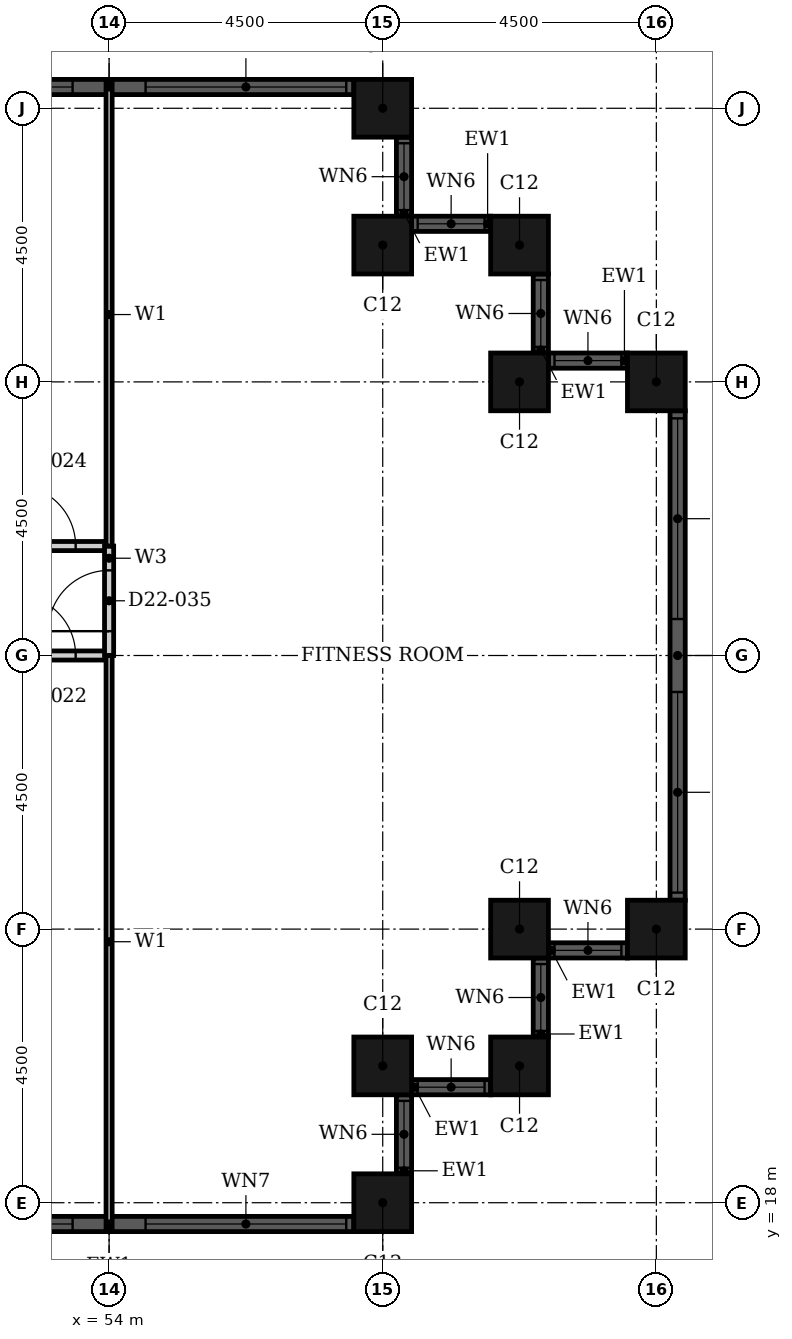
"""IFC4 building model, lengths in metres.
Left out: names, types, materials, properties, quantities, classifications, styles, units other than length and angle.
Written with IfcOpenShell. Run it as: python <this file> out.ifc"""

import sys

from ifc_helpers import new_model, si_unit, direction, frame, frame_2d, origin, origin_2d, place, context, subcontext, project, spatial, rectangle, hollow_rectangle, extrude, element, fill, save


model = new_model("IFC4")
c1 = context("Model", 3, precision=1e-05, world=origin(), true_north=direction((0.0, 1.0)))
c2 = subcontext(c1, "Body", "Model", "MODEL_VIEW")
j1 = project(units=[si_unit("LENGTHUNIT", "METRE"), si_unit("PLANEANGLEUNIT", "RADIAN")], contexts=[c1])
p1 = place(None, origin())
s1 = spatial("IfcSite", under=j1, at=p1, CompositionType="ELEMENT")
p2 = place(p1, origin())
s2 = spatial("IfcBuilding", under=s1, at=p2, CompositionType="ELEMENT")
p3 = place(p2, frame((0.0, 0.0, 92.4)))
s3 = spatial("IfcBuildingStorey", under=s2, at=p3, CompositionType="ELEMENT", Elevation=92.4)
for number, where, z_axis, x_axis in (
    (1, (58.5, 18.0, 0.0), (0.0, 0.0, 1.0), (1.0, 0.0, 0.0)),
    (2, (58.5, 20.25, 0.0), (0.0, 0.0, 1.0), (1.0, 0.0, 0.0)),
    (3, (60.75, 20.25, 0.0), (0.0, 0.0, 1.0), (1.0, 0.0, 0.0)),
    (4, (60.75, 22.5, 0.0), (0.0, 0.0, 1.0), (1.0, 0.0, 0.0)),
    (5, (63.0, 22.5, 0.0), (0.0, 0.0, 1.0), (1.0, 0.0, 0.0)),
    (6, (63.0, 31.5, 0.0), (0.0, 0.0, 1.0), (1.0, 0.0, 0.0)),
    (7, (60.75, 31.5, 0.0), (0.0, 0.0, 1.0), (1.0, 0.0, 0.0)),
    (8, (60.75, 33.75, 0.0), (0.0, 0.0, 1.0), (1.0, 0.0, 0.0)),
    (9, (58.5, 33.75, 0.0), (0.0, 0.0, 1.0), (1.0, 0.0, 0.0)),
    (10, (58.5, 36.0, 0.0), (0.0, 0.0, 1.0), (1.0, 0.0, 0.0)),
):
    element("IfcColumn", number, at=place(p3, frame(where, z_axis=z_axis, x_axis=x_axis)), inside=s3, PredefinedType="COLUMN", context=c2, shape_type="SweptSolid", body=[
        extrude(hollow_rectangle(XDim=0.95, YDim=0.95, WallThickness=0.03, at=origin_2d()), origin(), (0.0, 0.0, 1.0), 3.6),
    ])
p4 = place(p3, frame((49.975, 17.65, 0.0), z_axis=(0.0, 0.0, 1.0), x_axis=(1.0, 0.0, 0.0)))
e11 = element("IfcWall", 11, at=p4, inside=s3, PredefinedType="SOLIDWALL", context=c2, shape_type="SweptSolid", body=[
    extrude(rectangle(XDim=8.05, YDim=0.25, at=frame_2d((4.025, 0.0))), origin(), (0.0, 0.0, 1.0), 3.6),
])
p5 = place(p4, frame((0.125, 0.0, 0.9)))
e12 = element("IfcOpeningElement", 12, at=p5, cuts=e11, PredefinedType="OPENING", context=c2, shape_type="SweptSolid", body=[
    extrude(rectangle(XDim=3.3, YDim=1.85, at=frame_2d((1.65, 0.925))), frame((0.0, 0.135, 0.0), z_axis=(0.0, -1.0, 0.0), x_axis=(1.0, 0.0, 0.0)), (0.0, 0.0, 1.0), 0.27),
])
p6 = place(p4, frame((4.625, 0.0, 0.9)))
e13 = element("IfcOpeningElement", 13, at=p6, cuts=e11, PredefinedType="OPENING", context=c2, shape_type="SweptSolid", body=[
    extrude(rectangle(XDim=3.3, YDim=1.85, at=frame_2d((1.65, 0.925))), frame((0.0, 0.135, 0.0), z_axis=(0.0, -1.0, 0.0), x_axis=(1.0, 0.0, 0.0)), (0.0, 0.0, 1.0), 0.27),
])
p7 = place(p3, frame((58.85, 18.475, 0.0), z_axis=(0.0, 0.0, 1.0), x_axis=(0.0, 1.0, 0.0)))
e14 = element("IfcWall", 14, at=p7, inside=s3, PredefinedType="SOLIDWALL", context=c2, shape_type="SweptSolid", body=[
    extrude(rectangle(XDim=1.3, YDim=0.25, at=frame_2d((0.65, 0.0))), origin(), (0.0, 0.0, 1.0), 3.6),
])
p8 = place(p7, frame((0.1, 0.0, 0.9)))
e15 = element("IfcOpeningElement", 15, at=p8, cuts=e14, PredefinedType="OPENING", context=c2, shape_type="SweptSolid", body=[
    extrude(rectangle(XDim=1.1, YDim=1.85, at=frame_2d((0.55, 0.925))), frame((0.0, 0.135, 0.0), z_axis=(0.0, -1.0, 0.0), x_axis=(1.0, 0.0, 0.0)), (0.0, 0.0, 1.0), 0.27),
])
p9 = place(p3, frame((58.975, 19.9, 0.0), z_axis=(0.0, 0.0, 1.0), x_axis=(1.0, 0.0, 0.0)))
e16 = element("IfcWall", 16, at=p9, inside=s3, PredefinedType="SOLIDWALL", context=c2, shape_type="SweptSolid", body=[
    extrude(rectangle(XDim=1.3, YDim=0.25, at=frame_2d((0.65, 0.0))), origin(), (0.0, 0.0, 1.0), 3.6),
])
p10 = place(p9, frame((0.1, 0.0, 0.9)))
e17 = element("IfcOpeningElement", 17, at=p10, cuts=e16, PredefinedType="OPENING", context=c2, shape_type="SweptSolid", body=[
    extrude(rectangle(XDim=1.1, YDim=1.85, at=frame_2d((0.55, 0.925))), frame((0.0, 0.135, 0.0), z_axis=(0.0, -1.0, 0.0), x_axis=(1.0, 0.0, 0.0)), (0.0, 0.0, 1.0), 0.27),
])
p11 = place(p3, frame((61.1, 20.725, 0.0), z_axis=(0.0, 0.0, 1.0), x_axis=(0.0, 1.0, 0.0)))
e18 = element("IfcWall", 18, at=p11, inside=s3, PredefinedType="SOLIDWALL", context=c2, shape_type="SweptSolid", body=[
    extrude(rectangle(XDim=1.3, YDim=0.25, at=frame_2d((0.65, 0.0))), origin(), (0.0, 0.0, 1.0), 3.6),
])
p12 = place(p11, frame((0.1, 0.0, 0.9)))
e19 = element("IfcOpeningElement", 19, at=p12, cuts=e18, PredefinedType="OPENING", context=c2, shape_type="SweptSolid", body=[
    extrude(rectangle(XDim=1.1, YDim=1.85, at=frame_2d((0.55, 0.925))), frame((0.0, 0.135, 0.0), z_axis=(0.0, -1.0, 0.0), x_axis=(1.0, 0.0, 0.0)), (0.0, 0.0, 1.0), 0.27),
])
p13 = place(p3, frame((61.225, 22.15, 0.0), z_axis=(0.0, 0.0, 1.0), x_axis=(1.0, 0.0, 0.0)))
e20 = element("IfcWall", 20, at=p13, inside=s3, PredefinedType="SOLIDWALL", context=c2, shape_type="SweptSolid", body=[
    extrude(rectangle(XDim=1.3, YDim=0.25, at=frame_2d((0.65, 0.0))), origin(), (0.0, 0.0, 1.0), 3.6),
])
p14 = place(p13, frame((0.1, 0.0, 0.9)))
e21 = element("IfcOpeningElement", 21, at=p14, cuts=e20, PredefinedType="OPENING", context=c2, shape_type="SweptSolid", body=[
    extrude(rectangle(XDim=1.1, YDim=1.85, at=frame_2d((0.55, 0.925))), frame((0.0, 0.135, 0.0), z_axis=(0.0, -1.0, 0.0), x_axis=(1.0, 0.0, 0.0)), (0.0, 0.0, 1.0), 0.27),
])
p15 = place(p3, frame((63.35, 22.975, 0.0), z_axis=(0.0, 0.0, 1.0), x_axis=(0.0, 1.0, 0.0)))
e22 = element("IfcWall", 22, at=p15, inside=s3, PredefinedType="SOLIDWALL", context=c2, shape_type="SweptSolid", body=[
    extrude(rectangle(XDim=8.05, YDim=0.25, at=frame_2d((4.025, 0.0))), origin(), (0.0, 0.0, 1.0), 3.6),
])
p16 = place(p15, frame((0.125, 0.0, 0.9)))
e23 = element("IfcOpeningElement", 23, at=p16, cuts=e22, PredefinedType="OPENING", context=c2, shape_type="SweptSolid", body=[
    extrude(rectangle(XDim=3.3, YDim=1.85, at=frame_2d((1.65, 0.925))), frame((0.0, 0.135, 0.0), z_axis=(0.0, -1.0, 0.0), x_axis=(1.0, 0.0, 0.0)), (0.0, 0.0, 1.0), 0.27),
])
p17 = place(p15, frame((4.625, 0.0, 0.9)))
e24 = element("IfcOpeningElement", 24, at=p17, cuts=e22, PredefinedType="OPENING", context=c2, shape_type="SweptSolid", body=[
    extrude(rectangle(XDim=3.3, YDim=1.85, at=frame_2d((1.65, 0.925))), frame((0.0, 0.135, 0.0), z_axis=(0.0, -1.0, 0.0), x_axis=(1.0, 0.0, 0.0)), (0.0, 0.0, 1.0), 0.27),
])
p18 = place(p3, frame((62.525, 31.85, 0.0), z_axis=(0.0, 0.0, 1.0), x_axis=(-1.0, 0.0, 0.0)))
e25 = element("IfcWall", 25, at=p18, inside=s3, PredefinedType="SOLIDWALL", context=c2, shape_type="SweptSolid", body=[
    extrude(rectangle(XDim=1.3, YDim=0.25, at=frame_2d((0.65, 0.0))), origin(), (0.0, 0.0, 1.0), 3.6),
])
p19 = place(p18, frame((0.1, 0.0, 0.9)))
e26 = element("IfcOpeningElement", 26, at=p19, cuts=e25, PredefinedType="OPENING", context=c2, shape_type="SweptSolid", body=[
    extrude(rectangle(XDim=1.1, YDim=1.85, at=frame_2d((0.55, 0.925))), frame((0.0, 0.135, 0.0), z_axis=(0.0, -1.0, 0.0), x_axis=(1.0, 0.0, 0.0)), (0.0, 0.0, 1.0), 0.27),
])
p20 = place(p3, frame((61.1, 31.975, 0.0), z_axis=(0.0, 0.0, 1.0), x_axis=(0.0, 1.0, 0.0)))
e27 = element("IfcWall", 27, at=p20, inside=s3, PredefinedType="SOLIDWALL", context=c2, shape_type="SweptSolid", body=[
    extrude(rectangle(XDim=1.3, YDim=0.25, at=frame_2d((0.65, 0.0))), origin(), (0.0, 0.0, 1.0), 3.6),
])
p21 = place(p20, frame((0.1, 0.0, 0.9)))
e28 = element("IfcOpeningElement", 28, at=p21, cuts=e27, PredefinedType="OPENING", context=c2, shape_type="SweptSolid", body=[
    extrude(rectangle(XDim=1.1, YDim=1.85, at=frame_2d((0.55, 0.925))), frame((0.0, 0.135, 0.0), z_axis=(0.0, -1.0, 0.0), x_axis=(1.0, 0.0, 0.0)), (0.0, 0.0, 1.0), 0.27),
])
p22 = place(p3, frame((60.275, 34.1, 0.0), z_axis=(0.0, 0.0, 1.0), x_axis=(-1.0, 0.0, 0.0)))
e29 = element("IfcWall", 29, at=p22, inside=s3, PredefinedType="SOLIDWALL", context=c2, shape_type="SweptSolid", body=[
    extrude(rectangle(XDim=1.3, YDim=0.25, at=frame_2d((0.65, 0.0))), origin(), (0.0, 0.0, 1.0), 3.6),
])
p23 = place(p22, frame((0.1, 0.0, 0.9)))
e30 = element("IfcOpeningElement", 30, at=p23, cuts=e29, PredefinedType="OPENING", context=c2, shape_type="SweptSolid", body=[
    extrude(rectangle(XDim=1.1, YDim=1.85, at=frame_2d((0.55, 0.925))), frame((0.0, 0.135, 0.0), z_axis=(0.0, -1.0, 0.0), x_axis=(1.0, 0.0, 0.0)), (0.0, 0.0, 1.0), 0.27),
])
p24 = place(p3, frame((58.85, 34.225, 0.0), z_axis=(0.0, 0.0, 1.0), x_axis=(0.0, 1.0, 0.0)))
e31 = element("IfcWall", 31, at=p24, inside=s3, PredefinedType="SOLIDWALL", context=c2, shape_type="SweptSolid", body=[
    extrude(rectangle(XDim=1.3, YDim=0.25, at=frame_2d((0.65, 0.0))), origin(), (0.0, 0.0, 1.0), 3.6),
])
p25 = place(p24, frame((0.1, 0.0, 0.9)))
e32 = element("IfcOpeningElement", 32, at=p25, cuts=e31, PredefinedType="OPENING", context=c2, shape_type="SweptSolid", body=[
    extrude(rectangle(XDim=1.1, YDim=1.85, at=frame_2d((0.55, 0.925))), frame((0.0, 0.135, 0.0), z_axis=(0.0, -1.0, 0.0), x_axis=(1.0, 0.0, 0.0)), (0.0, 0.0, 1.0), 0.27),
])
p26 = place(p3, frame((58.025, 36.35, 0.0), z_axis=(0.0, 0.0, 1.0), x_axis=(-1.0, 0.0, 0.0)))
e33 = element("IfcWall", 33, at=p26, inside=s3, PredefinedType="SOLIDWALL", context=c2, shape_type="SweptSolid", body=[
    extrude(rectangle(XDim=8.05, YDim=0.25, at=frame_2d((4.025, 0.0))), origin(), (0.0, 0.0, 1.0), 3.6),
])
p27 = place(p26, frame((0.125, 0.0, 0.9)))
e34 = element("IfcOpeningElement", 34, at=p27, cuts=e33, PredefinedType="OPENING", context=c2, shape_type="SweptSolid", body=[
    extrude(rectangle(XDim=3.3, YDim=1.85, at=frame_2d((1.65, 0.925))), frame((0.0, 0.135, 0.0), z_axis=(0.0, -1.0, 0.0), x_axis=(1.0, 0.0, 0.0)), (0.0, 0.0, 1.0), 0.27),
])
p28 = place(p26, frame((4.625, 0.0, 0.9)))
e35 = element("IfcOpeningElement", 35, at=p28, cuts=e33, PredefinedType="OPENING", context=c2, shape_type="SweptSolid", body=[
    extrude(rectangle(XDim=3.3, YDim=1.85, at=frame_2d((1.65, 0.925))), frame((0.0, 0.135, 0.0), z_axis=(0.0, -1.0, 0.0), x_axis=(1.0, 0.0, 0.0)), (0.0, 0.0, 1.0), 0.27),
])
p29 = place(p3, frame((46.8, 27.0, 0.0), z_axis=(0.0, 0.0, 1.0), x_axis=(1.0, 0.0, 0.0)))
e36 = element("IfcWall", 36, at=p29, inside=s3, PredefinedType="PARTITIONING", context=c2, shape_type="SweptSolid", body=[
    extrude(rectangle(XDim=7.2, YDim=0.15, at=frame_2d((3.6, 0.0))), origin(), (0.0, 0.0, 1.0), 2.48),
])
p30 = place(p29, frame((5.65, 0.0, 0.0)))
e37 = element("IfcOpeningElement", 37, at=p30, cuts=e36, PredefinedType="OPENING", context=c2, shape_type="SweptSolid", body=[
    extrude(rectangle(XDim=1.0, YDim=2.1, at=frame_2d((0.5, 1.05))), frame((0.0, 0.085, 0.0), z_axis=(0.0, -1.0, 0.0), x_axis=(1.0, 0.0, 0.0)), (0.0, 0.0, 1.0), 0.17),
])
p31 = place(p3, frame((46.8, 28.8, 0.0), z_axis=(0.0, 0.0, 1.0), x_axis=(1.0, 0.0, 0.0)))
e38 = element("IfcWall", 38, at=p31, inside=s3, PredefinedType="PARTITIONING", context=c2, shape_type="SweptSolid", body=[
    extrude(rectangle(XDim=7.2, YDim=0.15, at=frame_2d((3.6, 0.0))), origin(), (0.0, 0.0, 1.0), 3.2),
])
p32 = place(p31, frame((5.65, 0.0, 0.0)))
e39 = element("IfcOpeningElement", 39, at=p32, cuts=e38, PredefinedType="OPENING", context=c2, shape_type="SweptSolid", body=[
    extrude(rectangle(XDim=1.0, YDim=2.1, at=frame_2d((0.5, 1.05))), frame((0.0, 0.085, 0.0), z_axis=(0.0, -1.0, 0.0), x_axis=(1.0, 0.0, 0.0)), (0.0, 0.0, 1.0), 0.17),
])
p33 = place(p3, frame((54.0, 27.0, 0.0), z_axis=(0.0, 0.0, 1.0), x_axis=(0.0, 1.0, 0.0)))
e40 = element("IfcWall", 40, at=p33, inside=s3, PredefinedType="PARTITIONING", context=c2, shape_type="SweptSolid", body=[
    extrude(rectangle(XDim=1.8, YDim=0.15, at=frame_2d((0.9, 0.0))), origin(), (0.0, 0.0, 1.0), 3.2),
])
p34 = place(p33, frame((0.4, 0.0, 0.0)))
e41 = element("IfcOpeningElement", 41, at=p34, cuts=e40, PredefinedType="OPENING", context=c2, shape_type="SweptSolid", body=[
    extrude(rectangle(XDim=1.0, YDim=2.1, at=frame_2d((0.5, 1.05))), frame((0.0, 0.085, 0.0), z_axis=(0.0, -1.0, 0.0), x_axis=(1.0, 0.0, 0.0)), (0.0, 0.0, 1.0), 0.17),
])
p35 = place(p3, frame((54.0, 28.8, 0.0), z_axis=(0.0, 0.0, 1.0), x_axis=(0.0, 1.0, 0.0)))
e42 = element("IfcWall", 42, at=p35, inside=s3, PredefinedType="PARTITIONING", context=c2, shape_type="SweptSolid", body=[
    extrude(rectangle(XDim=7.615, YDim=0.1, at=frame_2d((3.808, 0.0))), origin(), (0.0, 0.0, 1.0), 3.2),
])
p36 = place(p3, frame((54.0, 17.585, 0.0), z_axis=(0.0, 0.0, 1.0), x_axis=(0.0, 1.0, 0.0)))
e43 = element("IfcWall", 43, at=p36, inside=s3, PredefinedType="PARTITIONING", context=c2, shape_type="SweptSolid", body=[
    extrude(rectangle(XDim=9.415, YDim=0.1, at=frame_2d((4.708, 0.0))), origin(), (0.0, 0.0, 1.0), 3.2),
])
p37 = place(p5, origin())
e44 = element("IfcWindow", 44, at=p37, inside=s3, PartitioningType="SINGLE_PANEL", PredefinedType="WINDOW", context=c2, shape_type="SweptSolid", body=[
    extrude(rectangle(XDim=3.3, YDim=1.85, at=frame_2d((1.65, 0.925))), frame((0.0, 0.03, 0.0), z_axis=(0.0, -1.0, 0.0), x_axis=(1.0, 0.0, 0.0)), (0.0, 0.0, 1.0), 0.06),
])
fill(e12, e44)
p38 = place(p6, origin())
e45 = element("IfcWindow", 45, at=p38, inside=s3, PartitioningType="SINGLE_PANEL", PredefinedType="WINDOW", context=c2, shape_type="SweptSolid", body=[
    extrude(rectangle(XDim=3.3, YDim=1.85, at=frame_2d((1.65, 0.925))), frame((0.0, 0.03, 0.0), z_axis=(0.0, -1.0, 0.0), x_axis=(1.0, 0.0, 0.0)), (0.0, 0.0, 1.0), 0.06),
])
fill(e13, e45)
p39 = place(p8, origin())
e46 = element("IfcWindow", 46, at=p39, inside=s3, PartitioningType="SINGLE_PANEL", PredefinedType="WINDOW", context=c2, shape_type="SweptSolid", body=[
    extrude(rectangle(XDim=1.1, YDim=1.85, at=frame_2d((0.55, 0.925))), frame((0.0, 0.03, 0.0), z_axis=(0.0, -1.0, 0.0), x_axis=(1.0, 0.0, 0.0)), (0.0, 0.0, 1.0), 0.06),
])
fill(e15, e46)
p40 = place(p10, origin())
e47 = element("IfcWindow", 47, at=p40, inside=s3, PartitioningType="SINGLE_PANEL", PredefinedType="WINDOW", context=c2, shape_type="SweptSolid", body=[
    extrude(rectangle(XDim=1.1, YDim=1.85, at=frame_2d((0.55, 0.925))), frame((0.0, 0.03, 0.0), z_axis=(0.0, -1.0, 0.0), x_axis=(1.0, 0.0, 0.0)), (0.0, 0.0, 1.0), 0.06),
])
fill(e17, e47)
p41 = place(p12, origin())
e48 = element("IfcWindow", 48, at=p41, inside=s3, PartitioningType="SINGLE_PANEL", PredefinedType="WINDOW", context=c2, shape_type="SweptSolid", body=[
    extrude(rectangle(XDim=1.1, YDim=1.85, at=frame_2d((0.55, 0.925))), frame((0.0, 0.03, 0.0), z_axis=(0.0, -1.0, 0.0), x_axis=(1.0, 0.0, 0.0)), (0.0, 0.0, 1.0), 0.06),
])
fill(e19, e48)
p42 = place(p14, origin())
e49 = element("IfcWindow", 49, at=p42, inside=s3, PartitioningType="SINGLE_PANEL", PredefinedType="WINDOW", context=c2, shape_type="SweptSolid", body=[
    extrude(rectangle(XDim=1.1, YDim=1.85, at=frame_2d((0.55, 0.925))), frame((0.0, 0.03, 0.0), z_axis=(0.0, -1.0, 0.0), x_axis=(1.0, 0.0, 0.0)), (0.0, 0.0, 1.0), 0.06),
])
fill(e21, e49)
p43 = place(p16, origin())
e50 = element("IfcWindow", 50, at=p43, inside=s3, PartitioningType="SINGLE_PANEL", PredefinedType="WINDOW", context=c2, shape_type="SweptSolid", body=[
    extrude(rectangle(XDim=3.3, YDim=1.85, at=frame_2d((1.65, 0.925))), frame((0.0, 0.03, 0.0), z_axis=(0.0, -1.0, 0.0), x_axis=(1.0, 0.0, 0.0)), (0.0, 0.0, 1.0), 0.06),
])
fill(e23, e50)
p44 = place(p17, origin())
e51 = element("IfcWindow", 51, at=p44, inside=s3, PartitioningType="SINGLE_PANEL", PredefinedType="WINDOW", context=c2, shape_type="SweptSolid", body=[
    extrude(rectangle(XDim=3.3, YDim=1.85, at=frame_2d((1.65, 0.925))), frame((0.0, 0.03, 0.0), z_axis=(0.0, -1.0, 0.0), x_axis=(1.0, 0.0, 0.0)), (0.0, 0.0, 1.0), 0.06),
])
fill(e24, e51)
p45 = place(p19, origin())
e52 = element("IfcWindow", 52, at=p45, inside=s3, PartitioningType="SINGLE_PANEL", PredefinedType="WINDOW", context=c2, shape_type="SweptSolid", body=[
    extrude(rectangle(XDim=1.1, YDim=1.85, at=frame_2d((0.55, 0.925))), frame((0.0, 0.03, 0.0), z_axis=(0.0, -1.0, 0.0), x_axis=(1.0, 0.0, 0.0)), (0.0, 0.0, 1.0), 0.06),
])
fill(e26, e52)
p46 = place(p21, origin())
e53 = element("IfcWindow", 53, at=p46, inside=s3, PartitioningType="SINGLE_PANEL", PredefinedType="WINDOW", context=c2, shape_type="SweptSolid", body=[
    extrude(rectangle(XDim=1.1, YDim=1.85, at=frame_2d((0.55, 0.925))), frame((0.0, 0.03, 0.0), z_axis=(0.0, -1.0, 0.0), x_axis=(1.0, 0.0, 0.0)), (0.0, 0.0, 1.0), 0.06),
])
fill(e28, e53)
p47 = place(p23, origin())
e54 = element("IfcWindow", 54, at=p47, inside=s3, PartitioningType="SINGLE_PANEL", PredefinedType="WINDOW", context=c2, shape_type="SweptSolid", body=[
    extrude(rectangle(XDim=1.1, YDim=1.85, at=frame_2d((0.55, 0.925))), frame((0.0, 0.03, 0.0), z_axis=(0.0, -1.0, 0.0), x_axis=(1.0, 0.0, 0.0)), (0.0, 0.0, 1.0), 0.06),
])
fill(e30, e54)
p48 = place(p25, origin())
e55 = element("IfcWindow", 55, at=p48, inside=s3, PartitioningType="SINGLE_PANEL", PredefinedType="WINDOW", context=c2, shape_type="SweptSolid", body=[
    extrude(rectangle(XDim=1.1, YDim=1.85, at=frame_2d((0.55, 0.925))), frame((0.0, 0.03, 0.0), z_axis=(0.0, -1.0, 0.0), x_axis=(1.0, 0.0, 0.0)), (0.0, 0.0, 1.0), 0.06),
])
fill(e32, e55)
p49 = place(p27, origin())
e56 = element("IfcWindow", 56, at=p49, inside=s3, PartitioningType="SINGLE_PANEL", PredefinedType="WINDOW", context=c2, shape_type="SweptSolid", body=[
    extrude(rectangle(XDim=3.3, YDim=1.85, at=frame_2d((1.65, 0.925))), frame((0.0, 0.03, 0.0), z_axis=(0.0, -1.0, 0.0), x_axis=(1.0, 0.0, 0.0)), (0.0, 0.0, 1.0), 0.06),
])
fill(e34, e56)
p50 = place(p28, origin())
e57 = element("IfcWindow", 57, at=p50, inside=s3, PartitioningType="SINGLE_PANEL", PredefinedType="WINDOW", context=c2, shape_type="SweptSolid", body=[
    extrude(rectangle(XDim=3.3, YDim=1.85, at=frame_2d((1.65, 0.925))), frame((0.0, 0.03, 0.0), z_axis=(0.0, -1.0, 0.0), x_axis=(1.0, 0.0, 0.0)), (0.0, 0.0, 1.0), 0.06),
])
fill(e35, e57)
p51 = place(p30, origin())
e58 = element("IfcDoor", 58, at=p51, inside=s3, OperationType="SINGLE_SWING_RIGHT", PredefinedType="DOOR", context=c2, shape_type="SweptSolid", body=[
    extrude(rectangle(XDim=1.0, YDim=2.1, at=frame_2d((0.5, 1.05))), frame((0.0, 0.025, 0.0), z_axis=(0.0, -1.0, 0.0), x_axis=(1.0, 0.0, 0.0)), (0.0, 0.0, 1.0), 0.05),
])
fill(e37, e58)
p52 = place(p32, origin())
e59 = element("IfcDoor", 59, at=p52, inside=s3, OperationType="SINGLE_SWING_RIGHT", PredefinedType="DOOR", context=c2, shape_type="SweptSolid", body=[
    extrude(rectangle(XDim=1.0, YDim=2.1, at=frame_2d((0.5, 1.05))), frame((0.0, 0.025, 0.0), z_axis=(0.0, -1.0, 0.0), x_axis=(1.0, 0.0, 0.0)), (0.0, 0.0, 1.0), 0.05),
])
fill(e39, e59)
p53 = place(p34, origin())
e60 = element("IfcDoor", 60, at=p53, inside=s3, OperationType="SINGLE_SWING_LEFT", PredefinedType="DOOR", context=c2, shape_type="SweptSolid", body=[
    extrude(rectangle(XDim=1.0, YDim=2.1, at=frame_2d((0.5, 1.05))), frame((0.0, 0.025, 0.0), z_axis=(0.0, -1.0, 0.0), x_axis=(1.0, 0.0, 0.0)), (0.0, 0.0, 1.0), 0.05),
])
fill(e41, e60)
save(model, sys.argv[1])
